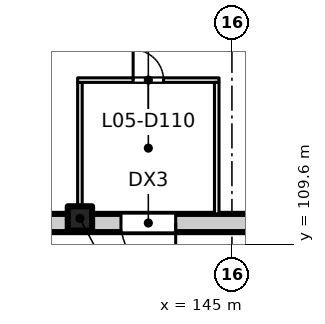
"""IFC4 building model, lengths in metres.
Left out: names, types, materials, properties, quantities, classifications, styles, units other than length and angle.
Written with IfcOpenShell. Run it as: python <this file> out.ifc"""

import sys

from ifc_helpers import new_model, si_unit, direction, frame, frame_2d, origin, origin_2d, place, context, subcontext, project, spatial, rectangle, extrude, element, fill, save


model = new_model("IFC4")
c1 = context("Model", 3, precision=1e-05, world=origin(), true_north=direction((0.0, 1.0)))
c2 = subcontext(c1, "Body", "Model", "MODEL_VIEW")
j1 = project(units=[si_unit("LENGTHUNIT", "METRE"), si_unit("PLANEANGLEUNIT", "RADIAN")], contexts=[c1])
p1 = place(None, origin())
s1 = spatial("IfcSite", under=j1, at=p1, CompositionType="ELEMENT")
p2 = place(p1, origin())
s2 = spatial("IfcBuilding", under=s1, at=p2, CompositionType="ELEMENT")
p3 = place(p2, frame((0.0, 0.0, 27.5)))
s3 = spatial("IfcBuildingStorey", under=s2, at=p3, CompositionType="ELEMENT", Elevation=27.5)
p4 = place(p3, frame((140.0, 110.45, 0.0), z_axis=(0.0, 0.0, 1.0), x_axis=(1.0, 0.0, 0.0)))
e1 = element("IfcColumn", 1, at=p4, inside=s3, PredefinedType="COLUMN", context=c2, shape_type="SweptSolid", body=[
    extrude(rectangle(XDim=0.8, YDim=0.8, at=origin_2d()), origin(), (0.0, 0.0, 1.0), 4.0),
])
p5 = place(p3, frame((162.93, 110.3, 0.0), z_axis=(0.0, 0.0, 1.0), x_axis=(-1.0, 0.0, 0.0)))
e2 = element("IfcWall", 2, at=p5, inside=s3, PredefinedType="SOLIDWALL", context=c2, shape_type="SweptSolid", body=[
    extrude(rectangle(XDim=31.93, YDim=0.6, at=frame_2d((15.965, 0.0))), origin(), (0.0, 0.0, 1.0), 3.625),
])
p6 = place(p5, frame((1.78, 0.0, 0.0)))
e3 = element("IfcOpeningElement", 3, at=p6, cuts=e2, PredefinedType="OPENING", context=c2, shape_type="SweptSolid", body=[
    extrude(rectangle(XDim=1.8, YDim=2.4, at=frame_2d((0.9, 1.2))), frame((0.0, 0.31, 0.0), z_axis=(0.0, -1.0, 0.0), x_axis=(1.0, 0.0, 0.0)), (0.0, 0.0, 1.0), 0.62),
])
p7 = place(p5, frame((5.98, 0.0, 0.9)))
e4 = element("IfcOpeningElement", 4, at=p7, cuts=e2, PredefinedType="OPENING", context=c2, shape_type="SweptSolid", body=[
    extrude(rectangle(XDim=2.4, YDim=2.4, at=frame_2d((1.2, 1.2))), frame((0.0, 0.31, 0.0), z_axis=(0.0, -1.0, 0.0), x_axis=(1.0, 0.0, 0.0)), (0.0, 0.0, 1.0), 0.62),
])
p8 = place(p5, frame((10.48, 0.0, 0.9)))
e5 = element("IfcOpeningElement", 5, at=p8, cuts=e2, PredefinedType="OPENING", context=c2, shape_type="SweptSolid", body=[
    extrude(rectangle(XDim=2.4, YDim=2.4, at=frame_2d((1.2, 1.2))), frame((0.0, 0.31, 0.0), z_axis=(0.0, -1.0, 0.0), x_axis=(1.0, 0.0, 0.0)), (0.0, 0.0, 1.0), 0.62),
])
p9 = place(p5, frame((14.98, 0.0, 0.9)))
e6 = element("IfcOpeningElement", 6, at=p9, cuts=e2, PredefinedType="OPENING", context=c2, shape_type="SweptSolid", body=[
    extrude(rectangle(XDim=2.4, YDim=2.4, at=frame_2d((1.2, 1.2))), frame((0.0, 0.31, 0.0), z_axis=(0.0, -1.0, 0.0), x_axis=(1.0, 0.0, 0.0)), (0.0, 0.0, 1.0), 0.62),
])
p10 = place(p5, frame((19.78, 0.0, 0.0)))
e7 = element("IfcOpeningElement", 7, at=p10, cuts=e2, PredefinedType="OPENING", context=c2, shape_type="SweptSolid", body=[
    extrude(rectangle(XDim=1.8, YDim=2.4, at=frame_2d((0.9, 1.2))), frame((0.0, 0.31, 0.0), z_axis=(0.0, -1.0, 0.0), x_axis=(1.0, 0.0, 0.0)), (0.0, 0.0, 1.0), 0.62),
])
p11 = place(p5, frame((23.98, 0.0, 0.9)))
e8 = element("IfcOpeningElement", 8, at=p11, cuts=e2, PredefinedType="OPENING", context=c2, shape_type="SweptSolid", body=[
    extrude(rectangle(XDim=2.4, YDim=2.4, at=frame_2d((1.2, 1.2))), frame((0.0, 0.31, 0.0), z_axis=(0.0, -1.0, 0.0), x_axis=(1.0, 0.0, 0.0)), (0.0, 0.0, 1.0), 0.62),
])
p12 = place(p5, frame((28.48, 0.0, 0.9)))
e9 = element("IfcOpeningElement", 9, at=p12, cuts=e2, PredefinedType="OPENING", context=c2, shape_type="SweptSolid", body=[
    extrude(rectangle(XDim=2.4, YDim=2.4, at=frame_2d((1.2, 1.2))), frame((0.0, 0.31, 0.0), z_axis=(0.0, -1.0, 0.0), x_axis=(1.0, 0.0, 0.0)), (0.0, 0.0, 1.0), 0.62),
])
p13 = place(p3, frame((140.0, 110.6, 0.0), z_axis=(0.0, 0.0, 1.0), x_axis=(0.0, 1.0, 0.0)))
e10 = element("IfcWall", 10, at=p13, inside=s3, PredefinedType="PARTITIONING", context=c2, shape_type="SweptSolid", body=[
    extrude(rectangle(XDim=4.325, YDim=0.15, at=frame_2d((2.163, 0.0))), origin(), (0.0, 0.0, 1.0), 3.625),
])
p14 = place(p3, frame((139.925, 115.0, 0.0), z_axis=(0.0, 0.0, 1.0), x_axis=(1.0, 0.0, 0.0)))
e11 = element("IfcWall", 11, at=p14, inside=s3, PredefinedType="PARTITIONING", context=c2, shape_type="SweptSolid", body=[
    extrude(rectangle(XDim=4.65, YDim=0.15, at=frame_2d((2.325, 0.0))), origin(), (0.0, 0.0, 1.0), 3.625),
])
p15 = place(p14, frame((1.825, 0.0, 0.0)))
e12 = element("IfcOpeningElement", 12, at=p15, cuts=e11, PredefinedType="OPENING", context=c2, shape_type="SweptSolid", body=[
    extrude(rectangle(XDim=1.0, YDim=2.1, at=frame_2d((0.5, 1.05))), frame((0.0, 0.085, 0.0), z_axis=(0.0, -1.0, 0.0), x_axis=(1.0, 0.0, 0.0)), (0.0, 0.0, 1.0), 0.17),
])
p16 = place(p3, frame((144.5, 114.925, 0.0), z_axis=(0.0, 0.0, 1.0), x_axis=(0.0, -1.0, 0.0)))
e13 = element("IfcWall", 13, at=p16, inside=s3, PredefinedType="PARTITIONING", context=c2, shape_type="SweptSolid", body=[
    extrude(rectangle(XDim=4.325, YDim=0.15, at=frame_2d((2.163, 0.0))), origin(), (0.0, 0.0, 1.0), 3.625),
])
p17 = place(p10, origin())
e14 = element("IfcDoor", 14, at=p17, inside=s3, OperationType="DOUBLE_DOOR_SINGLE_SWING", PredefinedType="DOOR", context=c2, shape_type="SweptSolid", body=[
    extrude(rectangle(XDim=1.8, YDim=2.4, at=frame_2d((0.9, 1.2))), frame((0.0, 0.025, 0.0), z_axis=(0.0, -1.0, 0.0), x_axis=(1.0, 0.0, 0.0)), (0.0, 0.0, 1.0), 0.05),
])
fill(e7, e14)
p18 = place(p15, origin())
e15 = element("IfcDoor", 15, at=p18, inside=s3, OperationType="SINGLE_SWING_LEFT", PredefinedType="DOOR", context=c2, shape_type="SweptSolid", body=[
    extrude(rectangle(XDim=1.0, YDim=2.1, at=frame_2d((0.5, 1.05))), frame((0.0, 0.025, 0.0), z_axis=(0.0, -1.0, 0.0), x_axis=(1.0, 0.0, 0.0)), (0.0, 0.0, 1.0), 0.05),
])
fill(e12, e15)
save(model, sys.argv[1])
